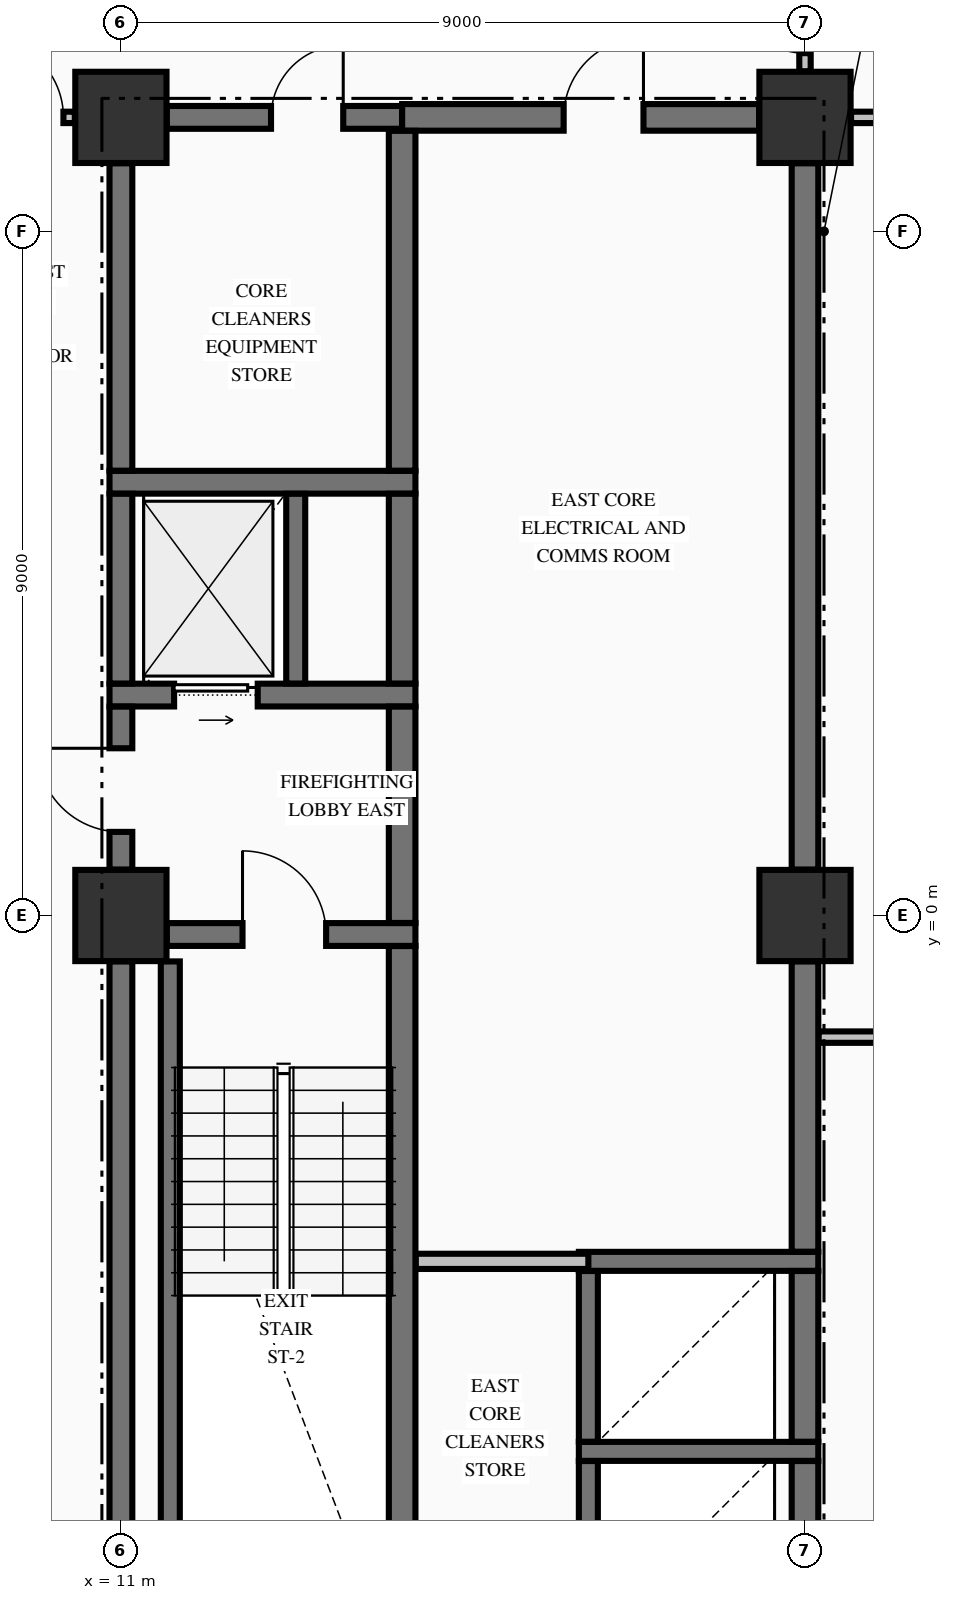
"""IFC4 building model, lengths in metres.
Left out: names, types, materials, properties, quantities, classifications, styles, units other than length and angle.
Written with IfcOpenShell. Run it as: python <this file> out.ifc"""

import sys

from ifc_helpers import new_model, si_unit, direction, frame, frame_2d, origin, origin_2d, place, context, subcontext, project, spatial, rectangle, extrude, element, fill, save


model = new_model("IFC4")
c1 = context("Model", 3, precision=1e-05, world=origin(), true_north=direction((0.0, 1.0)))
c2 = subcontext(c1, "Body", "Model", "MODEL_VIEW")
j1 = project(units=[si_unit("LENGTHUNIT", "METRE"), si_unit("PLANEANGLEUNIT", "RADIAN")], contexts=[c1])
p1 = place(None, origin())
s1 = spatial("IfcSite", under=j1, at=p1, CompositionType="ELEMENT")
p2 = place(p1, origin())
s2 = spatial("IfcBuilding", under=s1, at=p2, CompositionType="ELEMENT")
p3 = place(p2, frame((0.0, 0.0, 45.05)))
s3 = spatial("IfcBuildingStorey", under=s2, at=p3, CompositionType="ELEMENT", Elevation=45.05)
for number, where, z_axis, x_axis in (
    (1, (11.0, 0.0, -0.25), (0.0, 0.0, 1.0), (1.0, 0.0, 0.0)),
    (2, (11.0, 10.5, -0.25), (0.0, 0.0, 1.0), (1.0, 0.0, 0.0)),
    (3, (20.0, 10.5, -0.25), (0.0, 0.0, 1.0), (1.0, 0.0, 0.0)),
    (4, (20.0, 0.0, -0.25), (0.0, 0.0, 1.0), (1.0, 0.0, 0.0)),
):
    element("IfcColumn", number, at=place(p3, frame(where, z_axis=z_axis, x_axis=x_axis)), inside=s3, PredefinedType="COLUMN", context=c2, shape_type="SweptSolid", body=[
        extrude(rectangle(XDim=1.2, YDim=1.2, at=origin_2d()), origin(), (0.0, 0.0, 1.0), 3.57),
    ])
for number, where, z_axis, x_axis in (
    (5, (17.025, -7.05, 0.0), (0.0, 0.0, 1.0), (1.0, 0.0, 0.0)),
    (6, (17.025, -4.55, 0.0), (0.0, 0.0, 1.0), (1.0, 0.0, 0.0)),
):
    element("IfcWall", number, at=place(p3, frame(where, z_axis=z_axis, x_axis=x_axis)), inside=s3, PredefinedType="SOLIDWALL", context=c2, shape_type="SweptSolid", body=[
        extrude(rectangle(XDim=3.15, YDim=0.25, at=frame_2d((1.575, 0.0))), origin(), (0.0, 0.0, 1.0), 3.32),
    ])
p4 = place(p3, frame((11.604, -0.25, 0.0), z_axis=(0.0, 0.0, 1.0), x_axis=(1.0, 0.0, 0.0)))
e7 = element("IfcWall", 7, at=p4, inside=s3, PredefinedType="SHEAR", context=c2, shape_type="SweptSolid", body=[
    extrude(rectangle(XDim=3.271, YDim=0.3, at=frame_2d((1.635, 0.0))), origin(), (0.0, 0.0, 1.0), 3.32),
])
p5 = place(p4, frame((0.996, 0.0, 0.0)))
e8 = element("IfcOpeningElement", 8, at=p5, cuts=e7, PredefinedType="OPENING", context=c2, shape_type="SweptSolid", body=[
    extrude(rectangle(XDim=1.1, YDim=2.15, at=frame_2d((0.55, 1.075))), frame((0.0, 0.16, 0.0), z_axis=(0.0, -1.0, 0.0), x_axis=(1.0, 0.0, 0.0)), (0.0, 0.0, 1.0), 0.32),
])
p6 = place(p3, frame((10.85, 2.9, 0.0), z_axis=(0.0, 0.0, 1.0), x_axis=(1.0, 0.0, 0.0)))
e9 = element("IfcWall", 9, at=p6, inside=s3, PredefinedType="SHEAR", context=c2, shape_type="SweptSolid", body=[
    extrude(rectangle(XDim=4.025, YDim=0.3, at=frame_2d((2.012, 0.0))), origin(), (0.0, 0.0, 1.0), 3.32),
])
p7 = place(p6, frame((0.85, 0.0, 0.0)))
e10 = element("IfcOpeningElement", 10, at=p7, cuts=e9, PredefinedType="OPENING", context=c2, shape_type="SweptSolid", body=[
    extrude(rectangle(XDim=1.1, YDim=2.2, at=frame_2d((0.55, 1.1))), frame((0.0, 0.16, 0.0), z_axis=(0.0, -1.0, 0.0), x_axis=(1.0, 0.0, 0.0)), (0.0, 0.0, 1.0), 0.32),
])
p8 = place(p3, frame((10.85, 5.7, 0.0), z_axis=(0.0, 0.0, 1.0), x_axis=(1.0, 0.0, 0.0)))
e11 = element("IfcWall", 11, at=p8, inside=s3, PredefinedType="SHEAR", context=c2, shape_type="SweptSolid", body=[
    extrude(rectangle(XDim=4.025, YDim=0.3, at=frame_2d((2.012, 0.0))), origin(), (0.0, 0.0, 1.0), 3.32),
])
p9 = place(p3, frame((11.604, 10.5, 0.0), z_axis=(0.0, 0.0, 1.0), x_axis=(1.0, 0.0, 0.0)))
e12 = element("IfcWall", 12, at=p9, inside=s3, PredefinedType="SHEAR", context=c2, shape_type="SweptSolid", body=[
    extrude(rectangle(XDim=3.096, YDim=0.3, at=frame_2d((1.548, 0.0))), origin(), (0.0, 0.0, 1.0), 3.32),
])
p10 = place(p9, frame((1.371, 0.0, 0.0)))
e13 = element("IfcOpeningElement", 13, at=p10, cuts=e12, PredefinedType="OPENING", context=c2, shape_type="SweptSolid", body=[
    extrude(rectangle(XDim=0.95, YDim=2.15, at=frame_2d((0.475, 1.075))), frame((0.0, 0.16, 0.0), z_axis=(0.0, -1.0, 0.0), x_axis=(1.0, 0.0, 0.0)), (0.0, 0.0, 1.0), 0.32),
])
p11 = place(p3, frame((14.7, 10.5, 0.0), z_axis=(0.0, 0.0, 1.0), x_axis=(1.0, 0.0, 0.0)))
e14 = element("IfcWall", 14, at=p11, inside=s3, PredefinedType="SHEAR", context=c2, shape_type="SweptSolid", body=[
    extrude(rectangle(XDim=4.696, YDim=0.35, at=frame_2d((2.348, 0.0))), origin(), (0.0, 0.0, 1.0), 3.32),
])
p12 = place(p11, frame((2.125, 0.0, 0.0)))
e15 = element("IfcOpeningElement", 15, at=p12, cuts=e14, PredefinedType="OPENING", context=c2, shape_type="SweptSolid", body=[
    extrude(rectangle(XDim=1.05, YDim=2.15, at=frame_2d((0.525, 1.075))), frame((0.0, 0.185, 0.0), z_axis=(0.0, -1.0, 0.0), x_axis=(1.0, 0.0, 0.0)), (0.0, 0.0, 1.0), 0.37),
])
p13 = place(p3, frame((14.878, -4.55, 0.0), z_axis=(0.0, 0.0, 1.0), x_axis=(1.0, 0.0, 0.0)))
e16 = element("IfcWall", 16, at=p13, inside=s3, PredefinedType="PARTITIONING", context=c2, shape_type="SweptSolid", body=[
    extrude(rectangle(XDim=2.272, YDim=0.2, at=frame_2d((1.136, 0.0))), origin(), (0.0, 0.0, 1.0), 3.32),
])
p14 = place(p3, frame((20.178, -1.6, 0.0), z_axis=(0.0, 0.0, 1.0), x_axis=(1.0, 0.0, 0.0)))
e17 = element("IfcWall", 17, at=p14, inside=s3, PredefinedType="PARTITIONING", context=c2, shape_type="SweptSolid", body=[
    extrude(rectangle(XDim=8.657, YDim=0.15, at=frame_2d((4.329, 0.0))), origin(), (0.0, 0.0, 1.0), 3.32),
])
p15 = place(p3, frame((-10.394, 10.5, 0.0), z_axis=(0.0, 0.0, 1.0), x_axis=(1.0, 0.0, 0.0)))
e18 = element("IfcWall", 18, at=p15, inside=s3, PredefinedType="PARTITIONING", context=c2, shape_type="SweptSolid", body=[
    extrude(rectangle(XDim=20.788, YDim=0.15, at=frame_2d((10.394, 0.0))), origin(), (0.0, 0.0, 1.0), 3.32),
])
p16 = place(p15, frame((0.15, 0.0, 0.0)))
e19 = element("IfcOpeningElement", 19, at=p16, cuts=e18, PredefinedType="OPENING", context=c2, shape_type="SweptSolid", body=[
    extrude(rectangle(XDim=1.05, YDim=2.15, at=frame_2d((0.525, 1.075))), frame((0.0, 0.085, 0.0), z_axis=(0.0, -1.0, 0.0), x_axis=(1.0, 0.0, 0.0)), (0.0, 0.0, 1.0), 0.17),
])
p17 = place(p15, frame((19.588, 0.0, 0.0)))
e20 = element("IfcOpeningElement", 20, at=p17, cuts=e18, PredefinedType="OPENING", context=c2, shape_type="SweptSolid", body=[
    extrude(rectangle(XDim=1.05, YDim=2.15, at=frame_2d((0.525, 1.075))), frame((0.0, 0.085, 0.0), z_axis=(0.0, -1.0, 0.0), x_axis=(1.0, 0.0, 0.0)), (0.0, 0.0, 1.0), 0.17),
])
p18 = place(p3, frame((20.606, 10.5, 0.0), z_axis=(0.0, 0.0, 1.0), x_axis=(1.0, 0.0, 0.0)))
e21 = element("IfcWall", 21, at=p18, inside=s3, PredefinedType="PARTITIONING", context=c2, shape_type="SweptSolid", body=[
    extrude(rectangle(XDim=8.229, YDim=0.15, at=frame_2d((4.115, 0.0))), origin(), (0.0, 0.0, 1.0), 3.32),
])
p19 = place(p18, frame((3.419, 0.0, 0.0)))
e22 = element("IfcOpeningElement", 22, at=p19, cuts=e21, PredefinedType="OPENING", context=c2, shape_type="SweptSolid", body=[
    extrude(rectangle(XDim=0.95, YDim=2.15, at=frame_2d((0.475, 1.075))), frame((0.0, 0.085, 0.0), z_axis=(0.0, -1.0, 0.0), x_axis=(1.0, 0.0, 0.0)), (0.0, 0.0, 1.0), 0.17),
])
p20 = place(p3, frame((11.0, -9.346, 0.0), z_axis=(0.0, 0.0, 1.0), x_axis=(0.0, 1.0, 0.0)))
e23 = element("IfcWall", 23, at=p20, inside=s3, PredefinedType="SHEAR", context=c2, shape_type="SweptSolid", body=[
    extrude(rectangle(XDim=8.742, YDim=0.3, at=frame_2d((4.371, 0.0))), origin(), (0.0, 0.0, 1.0), 3.32),
])
p21 = place(p3, frame((11.0, 0.604, 0.0), z_axis=(0.0, 0.0, 1.0), x_axis=(0.0, 1.0, 0.0)))
e24 = element("IfcWall", 24, at=p21, inside=s3, PredefinedType="SHEAR", context=c2, shape_type="SweptSolid", body=[
    extrude(rectangle(XDim=2.144, YDim=0.3, at=frame_2d((1.072, 0.0))), origin(), (0.0, 0.0, 1.0), 3.32),
])
p22 = place(p21, frame((0.496, 0.0, 0.0)))
e25 = element("IfcOpeningElement", 25, at=p22, cuts=e24, PredefinedType="OPENING", context=c2, shape_type="SweptSolid", body=[
    extrude(rectangle(XDim=1.1, YDim=2.15, at=frame_2d((0.55, 1.075))), frame((0.0, 0.16, 0.0), z_axis=(0.0, -1.0, 0.0), x_axis=(1.0, 0.0, 0.0)), (0.0, 0.0, 1.0), 0.32),
])
p23 = place(p3, frame((11.0, 3.052, 0.0), z_axis=(0.0, 0.0, 1.0), x_axis=(0.0, 1.0, 0.0)))
e26 = element("IfcWall", 26, at=p23, inside=s3, PredefinedType="SHEAR", context=c2, shape_type="SweptSolid", body=[
    extrude(rectangle(XDim=2.496, YDim=0.3, at=frame_2d((1.248, 0.0))), origin(), (0.0, 0.0, 1.0), 3.32),
])
p24 = place(p3, frame((11.0, 5.852, 0.0), z_axis=(0.0, 0.0, 1.0), x_axis=(0.0, 1.0, 0.0)))
e27 = element("IfcWall", 27, at=p24, inside=s3, PredefinedType="SHEAR", context=c2, shape_type="SweptSolid", body=[
    extrude(rectangle(XDim=4.044, YDim=0.3, at=frame_2d((2.022, 0.0))), origin(), (0.0, 0.0, 1.0), 3.32),
])
p25 = place(p3, frame((11.65, -9.346, 0.0), z_axis=(0.0, 0.0, 1.0), x_axis=(0.0, 1.0, 0.0)))
e28 = element("IfcWall", 28, at=p25, inside=s3, PredefinedType="SOLIDWALL", context=c2, shape_type="SweptSolid", body=[
    extrude(rectangle(XDim=8.742, YDim=0.25, at=frame_2d((4.371, 0.0))), origin(), (0.0, 0.0, 1.0), 3.32),
])
p26 = place(p3, frame((13.3, 3.052, 0.0), z_axis=(0.0, 0.0, 1.0), x_axis=(0.0, 1.0, 0.0)))
e29 = element("IfcWall", 29, at=p26, inside=s3, PredefinedType="SOLIDWALL", context=c2, shape_type="SweptSolid", body=[
    extrude(rectangle(XDim=2.496, YDim=0.25, at=frame_2d((1.248, 0.0))), origin(), (0.0, 0.0, 1.0), 3.32),
])
p27 = place(p3, frame((14.7, -9.773, 0.0), z_axis=(0.0, 0.0, 1.0), x_axis=(0.0, 1.0, 0.0)))
e30 = element("IfcWall", 30, at=p27, inside=s3, PredefinedType="SHEAR", context=c2, shape_type="SweptSolid", body=[
    extrude(rectangle(XDim=9.371, YDim=0.35, at=frame_2d((4.686, 0.0))), origin(), (0.0, 0.0, 1.0), 3.32),
])
p28 = place(p3, frame((14.7, -0.098, 0.0), z_axis=(0.0, 0.0, 1.0), x_axis=(0.0, 1.0, 0.0)))
e31 = element("IfcWall", 31, at=p28, inside=s3, PredefinedType="SHEAR", context=c2, shape_type="SweptSolid", body=[
    extrude(rectangle(XDim=2.846, YDim=0.35, at=frame_2d((1.423, 0.0))), origin(), (0.0, 0.0, 1.0), 3.32),
])
p29 = place(p3, frame((14.7, 3.052, 0.0), z_axis=(0.0, 0.0, 1.0), x_axis=(0.0, 1.0, 0.0)))
e32 = element("IfcWall", 32, at=p29, inside=s3, PredefinedType="SHEAR", context=c2, shape_type="SweptSolid", body=[
    extrude(rectangle(XDim=2.496, YDim=0.35, at=frame_2d((1.248, 0.0))), origin(), (0.0, 0.0, 1.0), 3.32),
])
p30 = place(p3, frame((14.7, 5.852, 0.0), z_axis=(0.0, 0.0, 1.0), x_axis=(0.0, 1.0, 0.0)))
e33 = element("IfcWall", 33, at=p30, inside=s3, PredefinedType="SHEAR", context=c2, shape_type="SweptSolid", body=[
    extrude(rectangle(XDim=4.471, YDim=0.35, at=frame_2d((2.235, 0.0))), origin(), (0.0, 0.0, 1.0), 3.32),
])
p31 = place(p3, frame((17.15, -9.773, 0.0), z_axis=(0.0, 0.0, 1.0), x_axis=(0.0, 1.0, 0.0)))
e34 = element("IfcWall", 34, at=p31, inside=s3, PredefinedType="SOLIDWALL", context=c2, shape_type="SweptSolid", body=[
    extrude(rectangle(XDim=2.596, YDim=0.25, at=frame_2d((1.298, 0.0))), origin(), (0.0, 0.0, 1.0), 3.32),
])
p32 = place(p3, frame((17.15, -6.923, 0.0), z_axis=(0.0, 0.0, 1.0), x_axis=(0.0, 1.0, 0.0)))
e35 = element("IfcWall", 35, at=p32, inside=s3, PredefinedType="SOLIDWALL", context=c2, shape_type="SweptSolid", body=[
    extrude(rectangle(XDim=2.246, YDim=0.25, at=frame_2d((1.123, 0.0))), origin(), (0.0, 0.0, 1.0), 3.32),
])
p33 = place(p3, frame((20.0, -9.346, 0.0), z_axis=(0.0, 0.0, 1.0), x_axis=(0.0, 1.0, 0.0)))
e36 = element("IfcWall", 36, at=p33, inside=s3, PredefinedType="SHEAR", context=c2, shape_type="SweptSolid", body=[
    extrude(rectangle(XDim=2.169, YDim=0.35, at=frame_2d((1.084, 0.0))), origin(), (0.0, 0.0, 1.0), 3.32),
])
p34 = place(p3, frame((20.0, -6.923, 0.0), z_axis=(0.0, 0.0, 1.0), x_axis=(0.0, 1.0, 0.0)))
e37 = element("IfcWall", 37, at=p34, inside=s3, PredefinedType="SHEAR", context=c2, shape_type="SweptSolid", body=[
    extrude(rectangle(XDim=2.246, YDim=0.35, at=frame_2d((1.123, 0.0))), origin(), (0.0, 0.0, 1.0), 3.32),
])
p35 = place(p3, frame((20.0, -4.423, 0.0), z_axis=(0.0, 0.0, 1.0), x_axis=(0.0, 1.0, 0.0)))
e38 = element("IfcWall", 38, at=p35, inside=s3, PredefinedType="SHEAR", context=c2, shape_type="SweptSolid", body=[
    extrude(rectangle(XDim=3.819, YDim=0.35, at=frame_2d((1.91, 0.0))), origin(), (0.0, 0.0, 1.0), 3.32),
])
p36 = place(p3, frame((20.0, 0.604, 0.0), z_axis=(0.0, 0.0, 1.0), x_axis=(0.0, 1.0, 0.0)))
e39 = element("IfcWall", 39, at=p36, inside=s3, PredefinedType="SHEAR", context=c2, shape_type="SweptSolid", body=[
    extrude(rectangle(XDim=9.292, YDim=0.35, at=frame_2d((4.646, 0.0))), origin(), (0.0, 0.0, 1.0), 3.32),
])
p37 = place(p3, frame((20.0, 11.106, 0.0), z_axis=(0.0, 0.0, 1.0), x_axis=(0.0, 1.0, 0.0)))
e40 = element("IfcWall", 40, at=p37, inside=s3, PredefinedType="PARTITIONING", context=c2, shape_type="SweptSolid", body=[
    extrude(rectangle(XDim=1.966, YDim=0.15, at=frame_2d((0.983, 0.0))), origin(), (0.0, 0.0, 1.0), 2.66),
])
p38 = place(p37, frame((0.239, 0.0, 0.0)))
e41 = element("IfcOpeningElement", 41, at=p38, cuts=e40, PredefinedType="OPENING", context=c2, shape_type="SweptSolid", body=[
    extrude(rectangle(XDim=0.95, YDim=2.15, at=frame_2d((0.475, 1.075))), frame((0.0, 0.085, 0.0), z_axis=(0.0, -1.0, 0.0), x_axis=(1.0, 0.0, 0.0)), (0.0, 0.0, 1.0), 0.17),
])
p39 = place(p5, origin())
e42 = element("IfcDoor", 42, at=p39, inside=s3, OperationType="SINGLE_SWING_LEFT", PredefinedType="DOOR", context=c2, shape_type="SweptSolid", body=[
    extrude(rectangle(XDim=1.1, YDim=2.15, at=frame_2d((0.55, 1.075))), frame((0.0, 0.025, 0.0), z_axis=(0.0, -1.0, 0.0), x_axis=(1.0, 0.0, 0.0)), (0.0, 0.0, 1.0), 0.05),
])
fill(e8, e42)
p40 = place(p22, origin())
e43 = element("IfcDoor", 43, at=p40, inside=s3, OperationType="SINGLE_SWING_RIGHT", PredefinedType="DOOR", context=c2, shape_type="SweptSolid", body=[
    extrude(rectangle(XDim=1.1, YDim=2.15, at=frame_2d((0.55, 1.075))), frame((0.0, 0.025, 0.0), z_axis=(0.0, -1.0, 0.0), x_axis=(1.0, 0.0, 0.0)), (0.0, 0.0, 1.0), 0.05),
])
fill(e25, e43)
p41 = place(p7, origin())
e44 = element("IfcDoor", 44, at=p41, inside=s3, OperationType="SLIDING_TO_RIGHT", PredefinedType="DOOR", context=c2, shape_type="SweptSolid", body=[
    extrude(rectangle(XDim=1.1, YDim=2.2, at=frame_2d((0.55, 1.1))), frame((0.0, 0.025, 0.0), z_axis=(0.0, -1.0, 0.0), x_axis=(1.0, 0.0, 0.0)), (0.0, 0.0, 1.0), 0.05),
])
fill(e10, e44)
p42 = place(p10, origin())
e45 = element("IfcDoor", 45, at=p42, inside=s3, OperationType="SINGLE_SWING_RIGHT", PredefinedType="DOOR", context=c2, shape_type="SweptSolid", body=[
    extrude(rectangle(XDim=0.95, YDim=2.15, at=frame_2d((0.475, 1.075))), frame((0.0, 0.025, 0.0), z_axis=(0.0, -1.0, 0.0), x_axis=(1.0, 0.0, 0.0)), (0.0, 0.0, 1.0), 0.05),
])
fill(e13, e45)
p43 = place(p12, origin())
e46 = element("IfcDoor", 46, at=p43, inside=s3, OperationType="SINGLE_SWING_RIGHT", PredefinedType="DOOR", context=c2, shape_type="SweptSolid", body=[
    extrude(rectangle(XDim=1.05, YDim=2.15, at=frame_2d((0.525, 1.075))), frame((0.0, 0.025, 0.0), z_axis=(0.0, -1.0, 0.0), x_axis=(1.0, 0.0, 0.0)), (0.0, 0.0, 1.0), 0.05),
])
fill(e15, e46)
p44 = place(p17, origin())
e47 = element("IfcDoor", 47, at=p44, inside=s3, OperationType="SINGLE_SWING_LEFT", PredefinedType="DOOR", context=c2, shape_type="SweptSolid", body=[
    extrude(rectangle(XDim=1.05, YDim=2.15, at=frame_2d((0.525, 1.075))), frame((0.0, 0.025, 0.0), z_axis=(0.0, -1.0, 0.0), x_axis=(1.0, 0.0, 0.0)), (0.0, 0.0, 1.0), 0.05),
])
fill(e20, e47)
p45 = place(p38, origin())
e48 = element("IfcDoor", 48, at=p45, inside=s3, OperationType="SINGLE_SWING_RIGHT", PredefinedType="DOOR", context=c2, shape_type="SweptSolid", body=[
    extrude(rectangle(XDim=0.95, YDim=2.15, at=frame_2d((0.475, 1.075))), frame((0.0, 0.025, 0.0), z_axis=(0.0, -1.0, 0.0), x_axis=(1.0, 0.0, 0.0)), (0.0, 0.0, 1.0), 0.05),
])
fill(e41, e48)
save(model, sys.argv[1])
